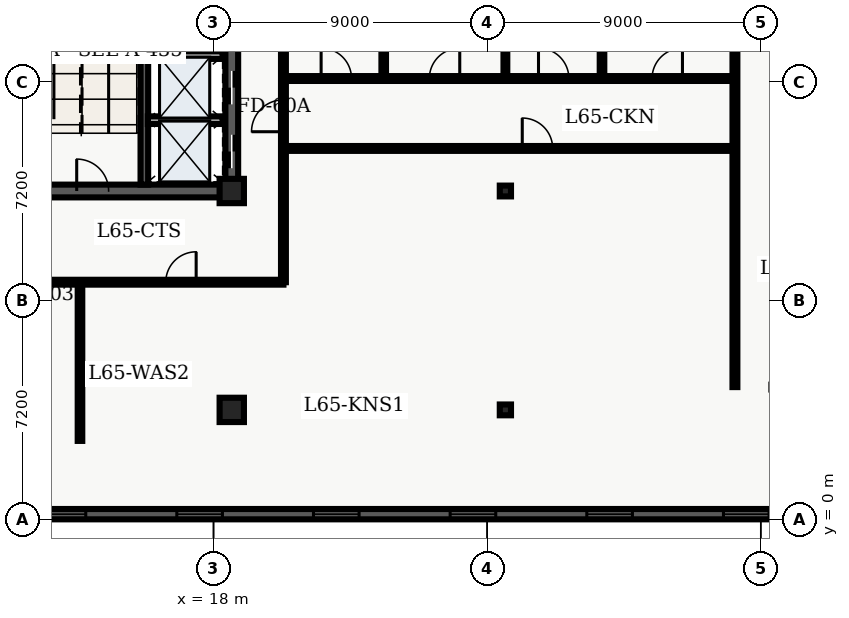
"""IFC4 building model, lengths in metres.
Left out: names, types, materials, properties, quantities, classifications, styles, units other than length and angle.
Written with IfcOpenShell. Run it as: python <this file> out.ifc"""

import sys

from ifc_helpers import new_model, entity, si_unit, converted_unit, direction, frame, origin_with_axes, origin_2d_with_axis, place, context, subcontext, project, spatial, polyline, rectangle, i_section, outline, extrude, element, fill, save


model = new_model("IFC4")
c1 = context("Model", 3, precision=1e-05, world=origin_with_axes(), true_north=direction((0.0, 1.0)))
c2 = subcontext(c1, "Body", "Model", "MODEL_VIEW")
j1 = project(units=[si_unit("LENGTHUNIT", "METRE"), converted_unit("PLANEANGLEUNIT", "DEGREE", entity("IfcPlaneAngleMeasure", 0.017), si_unit("PLANEANGLEUNIT", "RADIAN"), dimensions=[0, 0, 0, 0, 0, 0, 0])], contexts=[c1])
p1 = place(None, origin_with_axes())
s1 = spatial("IfcSite", under=j1, at=p1, CompositionType="ELEMENT")
p2 = place(p1, origin_with_axes())
s2 = spatial("IfcBuilding", under=s1, at=p2, CompositionType="ELEMENT")
p3 = place(p2, frame((0.0, 0.0, 264.6), z_axis=(0.0, 0.0, 1.0), x_axis=(1.0, 0.0, 0.0)))
s3 = spatial("IfcBuildingStorey", under=s2, at=p3, CompositionType="ELEMENT", Elevation=264.6)
p4 = place(p3, frame((11.4, 10.8, 0.0), z_axis=(0.0, 0.0, 1.0), x_axis=(1.0, 0.0, 0.0)))
e1 = element("IfcWall", 1, at=p4, inside=s3, PredefinedType="SHEAR", context=c2, shape_type="SweptSolid", body=[
    extrude(outline(polyline([(0.0, -0.21), (7.2, -0.21), (7.2, 0.21), (0.0, 0.21), (0.0, -0.21)])), origin_with_axes(), (0.0, 0.0, 1.0), 3.66),
])
p5 = place(p4, frame((2.625, 0.0, 0.0), z_axis=(0.0, 0.0, 1.0), x_axis=(1.0, 0.0, 0.0)))
e2 = element("IfcOpeningElement", 2, at=p5, cuts=e1, PredefinedType="OPENING", context=c2, shape_type="SweptSolid", body=[
    extrude(rectangle(XDim=1.05, YDim=0.44, at=origin_2d_with_axis()), origin_with_axes(), (0.0, 0.0, 1.0), 2.15),
])
p6 = place(p3, frame((18.6, 10.8, 0.0), z_axis=(0.0, 0.0, 1.0), x_axis=(0.0, 1.0, 0.0)))
e3 = element("IfcWall", 3, at=p6, inside=s3, PredefinedType="SHEAR", context=c2, shape_type="SweptSolid", body=[
    extrude(outline(polyline([(0.0, -0.21), (13.5, -0.21), (13.5, 0.21), (0.0, 0.21), (0.0, -0.21)])), origin_with_axes(), (0.0, 0.0, 1.0), 3.66),
])
p7 = place(p6, frame((1.3, 0.0, 0.0), z_axis=(0.0, 0.0, 1.0), x_axis=(1.0, 0.0, 0.0)))
e4 = element("IfcOpeningElement", 4, at=p7, cuts=e3, PredefinedType="OPENING", context=c2, shape_type="SweptSolid", body=[
    extrude(rectangle(XDim=1.1, YDim=0.44, at=origin_2d_with_axis()), origin_with_axes(), (0.0, 0.0, 1.0), 2.15),
])
p8 = place(p6, frame((3.4, 0.0, 0.0), z_axis=(0.0, 0.0, 1.0), x_axis=(1.0, 0.0, 0.0)))
e5 = element("IfcOpeningElement", 5, at=p8, cuts=e3, PredefinedType="OPENING", context=c2, shape_type="SweptSolid", body=[
    extrude(rectangle(XDim=1.1, YDim=0.44, at=origin_2d_with_axis()), origin_with_axes(), (0.0, 0.0, 1.0), 2.15),
])
p9 = place(p6, frame((11.125, 0.0, 0.0), z_axis=(0.0, 0.0, 1.0), x_axis=(1.0, 0.0, 0.0)))
e6 = element("IfcOpeningElement", 6, at=p9, cuts=e3, PredefinedType="OPENING", context=c2, shape_type="SweptSolid", body=[
    extrude(rectangle(XDim=1.05, YDim=0.44, at=origin_2d_with_axis()), origin_with_axes(), (0.0, 0.0, 1.0), 2.15),
])
p10 = place(p6, frame((6.675, 0.0, 0.0), z_axis=(0.0, 0.0, 1.0), x_axis=(1.0, 0.0, 0.0)))
e7 = element("IfcOpeningElement", 7, at=p10, cuts=e3, PredefinedType="OPENING", context=c2, shape_type="SweptSolid", body=[
    extrude(rectangle(XDim=0.95, YDim=0.44, at=origin_2d_with_axis()), origin_with_axes(), (0.0, 0.0, 1.0), 2.15),
])
p11 = place(p3, frame((15.725, 11.01, 0.0), z_axis=(0.0, 0.0, 1.0), x_axis=(0.0, 1.0, 0.0)))
e8 = element("IfcWall", 8, at=p11, inside=s3, PredefinedType="SHEAR", context=c2, shape_type="SweptSolid", body=[
    extrude(outline(polyline([(0.0, -0.125), (8.69, -0.125), (8.69, 0.125), (0.0, 0.125), (0.0, -0.125)])), origin_with_axes(), (0.0, 0.0, 1.0), 3.66),
])
for number, where, z_axis, x_axis in (
    (9, (18.6, 3.6, 0.0), (0.0, 0.0, 1.0), (1.0, 0.0, 0.0)),
    (10, (18.6, 10.8, 0.0), (0.0, 0.0, 1.0), (1.0, 0.0, 0.0)),
):
    element("IfcColumn", number, at=place(p3, frame(where, z_axis=z_axis, x_axis=x_axis)), inside=s3, PredefinedType="COLUMN", context=c2, shape_type="SweptSolid", body=[
        extrude(rectangle(XDim=0.8, YDim=0.8, at=origin_2d_with_axis()), origin_with_axes(), (0.0, 0.0, 1.0), 3.9),
    ])
for number, where, z_axis, x_axis in (
    (11, (27.6, 3.6, 0.0), (0.0, 0.0, 1.0), (1.0, 0.0, 0.0)),
    (12, (27.6, 10.8, 0.0), (0.0, 0.0, 1.0), (1.0, 0.0, 0.0)),
):
    element("IfcColumn", number, at=place(p3, frame(where, z_axis=z_axis, x_axis=x_axis)), inside=s3, PredefinedType="COLUMN", context=c2, shape_type="SweptSolid", body=[
        extrude(i_section(OverallWidth=0.369, OverallDepth=0.356, WebThickness=0.011, FlangeThickness=0.018, FilletRadius=0.018, at=origin_2d_with_axis()), origin_with_axes(), (0.0, 0.0, 1.0), 3.9),
    ])
for number, where, z_axis, x_axis in (
    (13, (15.84, 13.13, 0.0), (0.0, 0.0, 1.0), (1.0, 0.0, 0.0)),
    (14, (15.84, 15.27, 0.0), (0.0, 0.0, 1.0), (1.0, 0.0, 0.0)),
):
    element("IfcWall", number, at=place(p3, frame(where, z_axis=z_axis, x_axis=x_axis)), inside=s3, PredefinedType="SOLIDWALL", context=c2, shape_type="SweptSolid", body=[
        extrude(outline(polyline([(0.0, -0.125), (2.46, -0.125), (2.46, 0.125), (0.0, 0.125), (0.0, -0.125)])), origin_with_axes(), (0.0, 0.0, 1.0), 2.7),
    ])
p12 = place(p3, frame((8.135, 7.8, 0.0), z_axis=(0.0, 0.0, 1.0), x_axis=(1.0, 0.0, 0.0)))
e15 = element("IfcWall", 15, at=p12, inside=s3, PredefinedType="PARTITIONING", context=c2, shape_type="SweptSolid", body=[
    extrude(outline(polyline([(0.0, -0.08), (12.165, -0.08), (12.165, 0.08), (0.0, 0.08), (0.0, -0.08)])), origin_with_axes(), (0.0, 0.0, 1.0), 2.7),
])
p13 = place(p12, frame((3.994, 0.0, 0.0), z_axis=(0.0, 0.0, 1.0), x_axis=(1.0, 0.0, 0.0)))
e16 = element("IfcOpeningElement", 16, at=p13, cuts=e15, PredefinedType="OPENING", context=c2, shape_type="SweptSolid", body=[
    extrude(rectangle(XDim=1.0, YDim=0.18, at=origin_2d_with_axis()), origin_with_axes(), (0.0, 0.0, 1.0), 2.15),
])
p14 = place(p12, frame((8.794, 0.0, 0.0), z_axis=(0.0, 0.0, 1.0), x_axis=(1.0, 0.0, 0.0)))
e17 = element("IfcOpeningElement", 17, at=p14, cuts=e15, PredefinedType="OPENING", context=c2, shape_type="SweptSolid", body=[
    extrude(rectangle(XDim=1.0, YDim=0.18, at=origin_2d_with_axis()), origin_with_axes(), (0.0, 0.0, 1.0), 2.15),
])
p15 = place(p3, frame((20.3, 7.8, 0.0), z_axis=(0.0, 0.0, 1.0), x_axis=(0.0, 1.0, 0.0)))
e18 = element("IfcWall", 18, at=p15, inside=s3, PredefinedType="PARTITIONING", context=c2, shape_type="SweptSolid", body=[
    extrude(outline(polyline([(0.0, -0.08), (32.7, -0.08), (32.7, 0.08), (0.0, 0.08), (0.0, -0.08)])), origin_with_axes(), (0.0, 0.0, 1.0), 2.7),
])
p16 = place(p15, frame((14.2, 0.0, 0.0), z_axis=(0.0, 0.0, 1.0), x_axis=(1.0, 0.0, 0.0)))
e19 = element("IfcOpeningElement", 19, at=p16, cuts=e18, PredefinedType="OPENING", context=c2, shape_type="SweptSolid", body=[
    extrude(rectangle(XDim=1.0, YDim=0.18, at=origin_2d_with_axis()), origin_with_axes(), (0.0, 0.0, 1.0), 2.15),
])
p17 = place(p15, frame((18.779, 0.0, 0.0), z_axis=(0.0, 0.0, 1.0), x_axis=(1.0, 0.0, 0.0)))
e20 = element("IfcOpeningElement", 20, at=p17, cuts=e18, PredefinedType="OPENING", context=c2, shape_type="SweptSolid", body=[
    extrude(rectangle(XDim=1.0, YDim=0.18, at=origin_2d_with_axis()), origin_with_axes(), (0.0, 0.0, 1.0), 2.15),
])
p18 = place(p15, frame((23.784, 0.0, 0.0), z_axis=(0.0, 0.0, 1.0), x_axis=(1.0, 0.0, 0.0)))
e21 = element("IfcOpeningElement", 21, at=p18, cuts=e18, PredefinedType="OPENING", context=c2, shape_type="SweptSolid", body=[
    extrude(rectangle(XDim=1.0, YDim=0.18, at=origin_2d_with_axis()), origin_with_axes(), (0.0, 0.0, 1.0), 2.15),
])
p19 = place(p15, frame((27.651, 0.0, 0.0), z_axis=(0.0, 0.0, 1.0), x_axis=(1.0, 0.0, 0.0)))
e22 = element("IfcOpeningElement", 22, at=p19, cuts=e18, PredefinedType="OPENING", context=c2, shape_type="SweptSolid", body=[
    extrude(rectangle(XDim=1.0, YDim=0.18, at=origin_2d_with_axis()), origin_with_axes(), (0.0, 0.0, 1.0), 2.15),
])
p20 = place(p15, frame((5.475, 0.0, 0.0), z_axis=(0.0, 0.0, 1.0), x_axis=(1.0, 0.0, 0.0)))
e23 = element("IfcOpeningElement", 23, at=p20, cuts=e18, PredefinedType="OPENING", context=c2, shape_type="SweptSolid", body=[
    extrude(rectangle(XDim=1.05, YDim=0.18, at=origin_2d_with_axis()), origin_with_axes(), (0.0, 0.0, 1.0), 2.15),
])
p21 = place(p3, frame((13.608, 2.58, 0.0), z_axis=(0.0, 0.0, 1.0), x_axis=(0.0, 1.0, 0.0)))
e24 = element("IfcWall", 24, at=p21, inside=s3, PredefinedType="PARTITIONING", context=c2, shape_type="SweptSolid", body=[
    extrude(outline(polyline([(0.0, -0.075), (5.12, -0.075), (5.12, 0.075), (0.0, 0.075), (0.0, -0.075)])), origin_with_axes(), (0.0, 0.0, 1.0), 2.7),
])
p22 = place(p3, frame((20.3, 12.2, 0.0), z_axis=(0.0, 0.0, 1.0), x_axis=(1.0, 0.0, 0.0)))
e25 = element("IfcWall", 25, at=p22, inside=s3, PredefinedType="PARTITIONING", context=c2, shape_type="SweptSolid", body=[
    extrude(outline(polyline([(0.0, -0.08), (14.85, -0.08), (14.85, 0.08), (0.0, 0.08), (0.0, -0.08)])), origin_with_axes(), (0.0, 0.0, 1.0), 2.7),
])
p23 = place(p22, frame((8.355, 0.0, 0.0), z_axis=(0.0, 0.0, 1.0), x_axis=(1.0, 0.0, 0.0)))
e26 = element("IfcOpeningElement", 26, at=p23, cuts=e25, PredefinedType="OPENING", context=c2, shape_type="SweptSolid", body=[
    extrude(rectangle(XDim=1.0, YDim=0.18, at=origin_2d_with_axis()), origin_with_axes(), (0.0, 0.0, 1.0), 2.15),
])
p24 = place(p3, frame((20.3, 14.5, 0.0), z_axis=(0.0, 0.0, 1.0), x_axis=(1.0, 0.0, 0.0)))
e27 = element("IfcWall", 27, at=p24, inside=s3, PredefinedType="PARTITIONING", context=c2, shape_type="SweptSolid", body=[
    extrude(outline(polyline([(0.0, -0.08), (14.85, -0.08), (14.85, 0.08), (0.0, 0.08), (0.0, -0.08)])), origin_with_axes(), (0.0, 0.0, 1.0), 2.7),
])
p25 = place(p24, frame((1.739, 0.0, 0.0), z_axis=(0.0, 0.0, 1.0), x_axis=(1.0, 0.0, 0.0)))
e28 = element("IfcOpeningElement", 28, at=p25, cuts=e27, PredefinedType="OPENING", context=c2, shape_type="SweptSolid", body=[
    extrude(rectangle(XDim=1.0, YDim=0.18, at=origin_2d_with_axis()), origin_with_axes(), (0.0, 0.0, 1.0), 2.15),
])
p26 = place(p24, frame((5.299, 0.0, 0.0), z_axis=(0.0, 0.0, 1.0), x_axis=(1.0, 0.0, 0.0)))
e29 = element("IfcOpeningElement", 29, at=p26, cuts=e27, PredefinedType="OPENING", context=c2, shape_type="SweptSolid", body=[
    extrude(rectangle(XDim=1.0, YDim=0.18, at=origin_2d_with_axis()), origin_with_axes(), (0.0, 0.0, 1.0), 2.15),
])
p27 = place(p24, frame((8.889, 0.0, 0.0), z_axis=(0.0, 0.0, 1.0), x_axis=(1.0, 0.0, 0.0)))
e30 = element("IfcOpeningElement", 30, at=p27, cuts=e27, PredefinedType="OPENING", context=c2, shape_type="SweptSolid", body=[
    extrude(rectangle(XDim=1.0, YDim=0.18, at=origin_2d_with_axis()), origin_with_axes(), (0.0, 0.0, 1.0), 2.15),
])
p28 = place(p24, frame((12.624, 0.0, 0.0), z_axis=(0.0, 0.0, 1.0), x_axis=(1.0, 0.0, 0.0)))
e31 = element("IfcOpeningElement", 31, at=p28, cuts=e27, PredefinedType="OPENING", context=c2, shape_type="SweptSolid", body=[
    extrude(rectangle(XDim=1.0, YDim=0.18, at=origin_2d_with_axis()), origin_with_axes(), (0.0, 0.0, 1.0), 2.15),
])
p29 = place(p3, frame((35.15, 4.35, 0.0), z_axis=(0.0, 0.0, 1.0), x_axis=(0.0, 1.0, 0.0)))
e32 = element("IfcWall", 32, at=p29, inside=s3, PredefinedType="PARTITIONING", context=c2, shape_type="SweptSolid", body=[
    extrude(outline(polyline([(0.0, -0.08), (16.95, -0.08), (16.95, 0.08), (0.0, 0.08), (0.0, -0.08)])), origin_with_axes(), (0.0, 0.0, 1.0), 2.7),
])
p30 = place(p3, frame((23.598, 14.62, 0.0), z_axis=(0.0, 0.0, 1.0), x_axis=(0.0, 1.0, 0.0)))
e33 = element("IfcWall", 33, at=p30, inside=s3, PredefinedType="PARTITIONING", context=c2, shape_type="SweptSolid", body=[
    extrude(outline(polyline([(0.0, -0.075), (6.6, -0.075), (6.6, 0.075), (0.0, 0.075), (0.0, -0.075)])), origin_with_axes(), (0.0, 0.0, 1.0), 2.7),
])
p31 = place(p3, frame((27.6, 14.62, 0.0), z_axis=(0.0, 0.0, 1.0), x_axis=(0.0, 1.0, 0.0)))
e34 = element("IfcWall", 34, at=p31, inside=s3, PredefinedType="PARTITIONING", context=c2, shape_type="SweptSolid", body=[
    extrude(outline(polyline([(0.0, -0.062), (6.6, -0.062), (6.6, 0.062), (0.0, 0.062), (0.0, -0.062)])), origin_with_axes(), (0.0, 0.0, 1.0), 2.7),
])
p32 = place(p3, frame((30.778, 14.62, 0.0), z_axis=(0.0, 0.0, 1.0), x_axis=(0.0, 1.0, 0.0)))
e35 = element("IfcWall", 35, at=p32, inside=s3, PredefinedType="PARTITIONING", context=c2, shape_type="SweptSolid", body=[
    extrude(outline(polyline([(0.0, -0.075), (6.6, -0.075), (6.6, 0.075), (0.0, 0.075), (0.0, -0.075)])), origin_with_axes(), (0.0, 0.0, 1.0), 2.7),
])
p33 = place(p3, frame((47.36, 0.17, 0.0), z_axis=(0.0, 0.0, 1.0), x_axis=(-1.0, 0.0, 0.0)))
e36 = element("IfcWall", 36, at=p33, inside=s3, PredefinedType="SOLIDWALL", context=c2, shape_type="SweptSolid", body=[
    extrude(outline(polyline([(0.0, -0.17), (37.16, -0.17), (37.16, 0.17), (0.0, 0.17), (0.0, -0.17)])), origin_with_axes(), (0.0, 0.0, 1.0), 3.66),
])
p34 = place(p33, frame((2.847, 0.0, 0.45), z_axis=(0.0, 0.0, 1.0), x_axis=(1.0, 0.0, 0.0)))
e37 = element("IfcOpeningElement", 37, at=p34, cuts=e36, PredefinedType="OPENING", context=c2, shape_type="SweptSolid", body=[
    extrude(rectangle(XDim=1.5, YDim=0.36, at=origin_2d_with_axis()), origin_with_axes(), (0.0, 0.0, 1.0), 2.1),
])
p35 = place(p33, frame((7.342, 0.0, 0.45), z_axis=(0.0, 0.0, 1.0), x_axis=(1.0, 0.0, 0.0)))
e38 = element("IfcOpeningElement", 38, at=p35, cuts=e36, PredefinedType="OPENING", context=c2, shape_type="SweptSolid", body=[
    extrude(rectangle(XDim=1.5, YDim=0.36, at=origin_2d_with_axis()), origin_with_axes(), (0.0, 0.0, 1.0), 2.1),
])
p36 = place(p33, frame((11.837, 0.0, 0.45), z_axis=(0.0, 0.0, 1.0), x_axis=(1.0, 0.0, 0.0)))
e39 = element("IfcOpeningElement", 39, at=p36, cuts=e36, PredefinedType="OPENING", context=c2, shape_type="SweptSolid", body=[
    extrude(rectangle(XDim=1.5, YDim=0.36, at=origin_2d_with_axis()), origin_with_axes(), (0.0, 0.0, 1.0), 2.1),
])
p37 = place(p33, frame((16.332, 0.0, 0.45), z_axis=(0.0, 0.0, 1.0), x_axis=(1.0, 0.0, 0.0)))
e40 = element("IfcOpeningElement", 40, at=p37, cuts=e36, PredefinedType="OPENING", context=c2, shape_type="SweptSolid", body=[
    extrude(rectangle(XDim=1.5, YDim=0.36, at=origin_2d_with_axis()), origin_with_axes(), (0.0, 0.0, 1.0), 2.1),
])
p38 = place(p33, frame((20.827, 0.0, 0.45), z_axis=(0.0, 0.0, 1.0), x_axis=(1.0, 0.0, 0.0)))
e41 = element("IfcOpeningElement", 41, at=p38, cuts=e36, PredefinedType="OPENING", context=c2, shape_type="SweptSolid", body=[
    extrude(rectangle(XDim=1.5, YDim=0.36, at=origin_2d_with_axis()), origin_with_axes(), (0.0, 0.0, 1.0), 2.1),
])
p39 = place(p33, frame((25.322, 0.0, 0.45), z_axis=(0.0, 0.0, 1.0), x_axis=(1.0, 0.0, 0.0)))
e42 = element("IfcOpeningElement", 42, at=p39, cuts=e36, PredefinedType="OPENING", context=c2, shape_type="SweptSolid", body=[
    extrude(rectangle(XDim=1.5, YDim=0.36, at=origin_2d_with_axis()), origin_with_axes(), (0.0, 0.0, 1.0), 2.1),
])
p40 = place(p33, frame((29.817, 0.0, 0.45), z_axis=(0.0, 0.0, 1.0), x_axis=(1.0, 0.0, 0.0)))
e43 = element("IfcOpeningElement", 43, at=p40, cuts=e36, PredefinedType="OPENING", context=c2, shape_type="SweptSolid", body=[
    extrude(rectangle(XDim=1.5, YDim=0.36, at=origin_2d_with_axis()), origin_with_axes(), (0.0, 0.0, 1.0), 2.1),
])
p41 = place(p33, frame((34.312, 0.0, 0.45), z_axis=(0.0, 0.0, 1.0), x_axis=(1.0, 0.0, 0.0)))
e44 = element("IfcOpeningElement", 44, at=p41, cuts=e36, PredefinedType="OPENING", context=c2, shape_type="SweptSolid", body=[
    extrude(rectangle(XDim=1.5, YDim=0.36, at=origin_2d_with_axis()), origin_with_axes(), (0.0, 0.0, 1.0), 2.1),
])
p42 = place(p6, frame((1.3, 0.0, 0.0), z_axis=(0.0, 0.0, 1.0), x_axis=(1.0, 0.0, 0.0)))
e45 = element("IfcDoor", 45, at=p42, inside=s3, OperationType="SLIDING_TO_LEFT", PredefinedType="DOOR", context=c2, shape_type="SweptSolid", body=[
    extrude(rectangle(XDim=1.1, YDim=0.09, at=origin_2d_with_axis()), origin_with_axes(), (0.0, 0.0, 1.0), 2.15),
])
fill(e4, e45)
p43 = place(p6, frame((3.4, 0.0, 0.0), z_axis=(0.0, 0.0, 1.0), x_axis=(1.0, 0.0, 0.0)))
e46 = element("IfcDoor", 46, at=p43, inside=s3, OperationType="SLIDING_TO_RIGHT", PredefinedType="DOOR", context=c2, shape_type="SweptSolid", body=[
    extrude(rectangle(XDim=1.1, YDim=0.09, at=origin_2d_with_axis()), origin_with_axes(), (0.0, 0.0, 1.0), 2.15),
])
fill(e5, e46)
p44 = place(p4, frame((2.625, 0.0, 0.0), z_axis=(0.0, 0.0, 1.0), x_axis=(1.0, 0.0, 0.0)))
e47 = element("IfcDoor", 47, at=p44, inside=s3, OperationType="SINGLE_SWING_LEFT", PredefinedType="DOOR", context=c2, shape_type="SweptSolid", body=[
    extrude(rectangle(XDim=1.05, YDim=0.09, at=origin_2d_with_axis()), origin_with_axes(), (0.0, 0.0, 1.0), 2.15),
])
fill(e2, e47)
p45 = place(p12, frame((8.794, 0.0, 0.0), z_axis=(0.0, 0.0, 1.0), x_axis=(1.0, 0.0, 0.0)))
e48 = element("IfcDoor", 48, at=p45, inside=s3, OperationType="SINGLE_SWING_RIGHT", PredefinedType="DOOR", context=c2, shape_type="SweptSolid", body=[
    extrude(rectangle(XDim=1.0, YDim=0.09, at=origin_2d_with_axis()), origin_with_axes(), (0.0, 0.0, 1.0), 2.15),
])
fill(e17, e48)
p46 = place(p15, frame((5.475, 0.0, 0.0), z_axis=(0.0, 0.0, 1.0), x_axis=(1.0, 0.0, 0.0)))
e49 = element("IfcDoor", 49, at=p46, inside=s3, OperationType="SINGLE_SWING_LEFT", PredefinedType="DOOR", context=c2, shape_type="SweptSolid", body=[
    extrude(rectangle(XDim=1.05, YDim=0.09, at=origin_2d_with_axis()), origin_with_axes(), (0.0, 0.0, 1.0), 2.15),
])
fill(e23, e49)
p47 = place(p22, frame((8.355, 0.0, 0.0), z_axis=(0.0, 0.0, 1.0), x_axis=(1.0, 0.0, 0.0)))
e50 = element("IfcDoor", 50, at=p47, inside=s3, OperationType="SINGLE_SWING_LEFT", PredefinedType="DOOR", context=c2, shape_type="SweptSolid", body=[
    extrude(rectangle(XDim=1.0, YDim=0.09, at=origin_2d_with_axis()), origin_with_axes(), (0.0, 0.0, 1.0), 2.15),
])
fill(e26, e50)
p48 = place(p24, frame((1.739, 0.0, 0.0), z_axis=(0.0, 0.0, 1.0), x_axis=(1.0, 0.0, 0.0)))
e51 = element("IfcDoor", 51, at=p48, inside=s3, OperationType="SINGLE_SWING_LEFT", PredefinedType="DOOR", context=c2, shape_type="SweptSolid", body=[
    extrude(rectangle(XDim=1.0, YDim=0.09, at=origin_2d_with_axis()), origin_with_axes(), (0.0, 0.0, 1.0), 2.15),
])
fill(e28, e51)
p49 = place(p24, frame((5.299, 0.0, 0.0), z_axis=(0.0, 0.0, 1.0), x_axis=(1.0, 0.0, 0.0)))
e52 = element("IfcDoor", 52, at=p49, inside=s3, OperationType="SINGLE_SWING_RIGHT", PredefinedType="DOOR", context=c2, shape_type="SweptSolid", body=[
    extrude(rectangle(XDim=1.0, YDim=0.09, at=origin_2d_with_axis()), origin_with_axes(), (0.0, 0.0, 1.0), 2.15),
])
fill(e29, e52)
p50 = place(p24, frame((8.889, 0.0, 0.0), z_axis=(0.0, 0.0, 1.0), x_axis=(1.0, 0.0, 0.0)))
e53 = element("IfcDoor", 53, at=p50, inside=s3, OperationType="SINGLE_SWING_LEFT", PredefinedType="DOOR", context=c2, shape_type="SweptSolid", body=[
    extrude(rectangle(XDim=1.0, YDim=0.09, at=origin_2d_with_axis()), origin_with_axes(), (0.0, 0.0, 1.0), 2.15),
])
fill(e30, e53)
p51 = place(p24, frame((12.624, 0.0, 0.0), z_axis=(0.0, 0.0, 1.0), x_axis=(1.0, 0.0, 0.0)))
e54 = element("IfcDoor", 54, at=p51, inside=s3, OperationType="SINGLE_SWING_RIGHT", PredefinedType="DOOR", context=c2, shape_type="SweptSolid", body=[
    extrude(rectangle(XDim=1.0, YDim=0.09, at=origin_2d_with_axis()), origin_with_axes(), (0.0, 0.0, 1.0), 2.15),
])
fill(e31, e54)
p52 = place(p33, frame((11.837, 0.0, 0.45), z_axis=(0.0, 0.0, 1.0), x_axis=(1.0, 0.0, 0.0)))
e55 = element("IfcWindow", 55, at=p52, inside=s3, PredefinedType="WINDOW", context=c2, shape_type="SweptSolid", body=[
    extrude(rectangle(XDim=1.5, YDim=0.09, at=origin_2d_with_axis()), origin_with_axes(), (0.0, 0.0, 1.0), 2.1),
])
fill(e39, e55)
p53 = place(p33, frame((16.332, 0.0, 0.45), z_axis=(0.0, 0.0, 1.0), x_axis=(1.0, 0.0, 0.0)))
e56 = element("IfcWindow", 56, at=p53, inside=s3, PredefinedType="WINDOW", context=c2, shape_type="SweptSolid", body=[
    extrude(rectangle(XDim=1.5, YDim=0.09, at=origin_2d_with_axis()), origin_with_axes(), (0.0, 0.0, 1.0), 2.1),
])
fill(e40, e56)
p54 = place(p33, frame((20.827, 0.0, 0.45), z_axis=(0.0, 0.0, 1.0), x_axis=(1.0, 0.0, 0.0)))
e57 = element("IfcWindow", 57, at=p54, inside=s3, PredefinedType="WINDOW", context=c2, shape_type="SweptSolid", body=[
    extrude(rectangle(XDim=1.5, YDim=0.09, at=origin_2d_with_axis()), origin_with_axes(), (0.0, 0.0, 1.0), 2.1),
])
fill(e41, e57)
p55 = place(p33, frame((25.322, 0.0, 0.45), z_axis=(0.0, 0.0, 1.0), x_axis=(1.0, 0.0, 0.0)))
e58 = element("IfcWindow", 58, at=p55, inside=s3, PredefinedType="WINDOW", context=c2, shape_type="SweptSolid", body=[
    extrude(rectangle(XDim=1.5, YDim=0.09, at=origin_2d_with_axis()), origin_with_axes(), (0.0, 0.0, 1.0), 2.1),
])
fill(e42, e58)
p56 = place(p33, frame((29.817, 0.0, 0.45), z_axis=(0.0, 0.0, 1.0), x_axis=(1.0, 0.0, 0.0)))
e59 = element("IfcWindow", 59, at=p56, inside=s3, PredefinedType="WINDOW", context=c2, shape_type="SweptSolid", body=[
    extrude(rectangle(XDim=1.5, YDim=0.09, at=origin_2d_with_axis()), origin_with_axes(), (0.0, 0.0, 1.0), 2.1),
])
fill(e43, e59)
p57 = place(p33, frame((34.312, 0.0, 0.45), z_axis=(0.0, 0.0, 1.0), x_axis=(1.0, 0.0, 0.0)))
e60 = element("IfcWindow", 60, at=p57, inside=s3, PredefinedType="WINDOW", context=c2, shape_type="SweptSolid", body=[
    extrude(rectangle(XDim=1.5, YDim=0.09, at=origin_2d_with_axis()), origin_with_axes(), (0.0, 0.0, 1.0), 2.1),
])
fill(e44, e60)
save(model, sys.argv[1])
